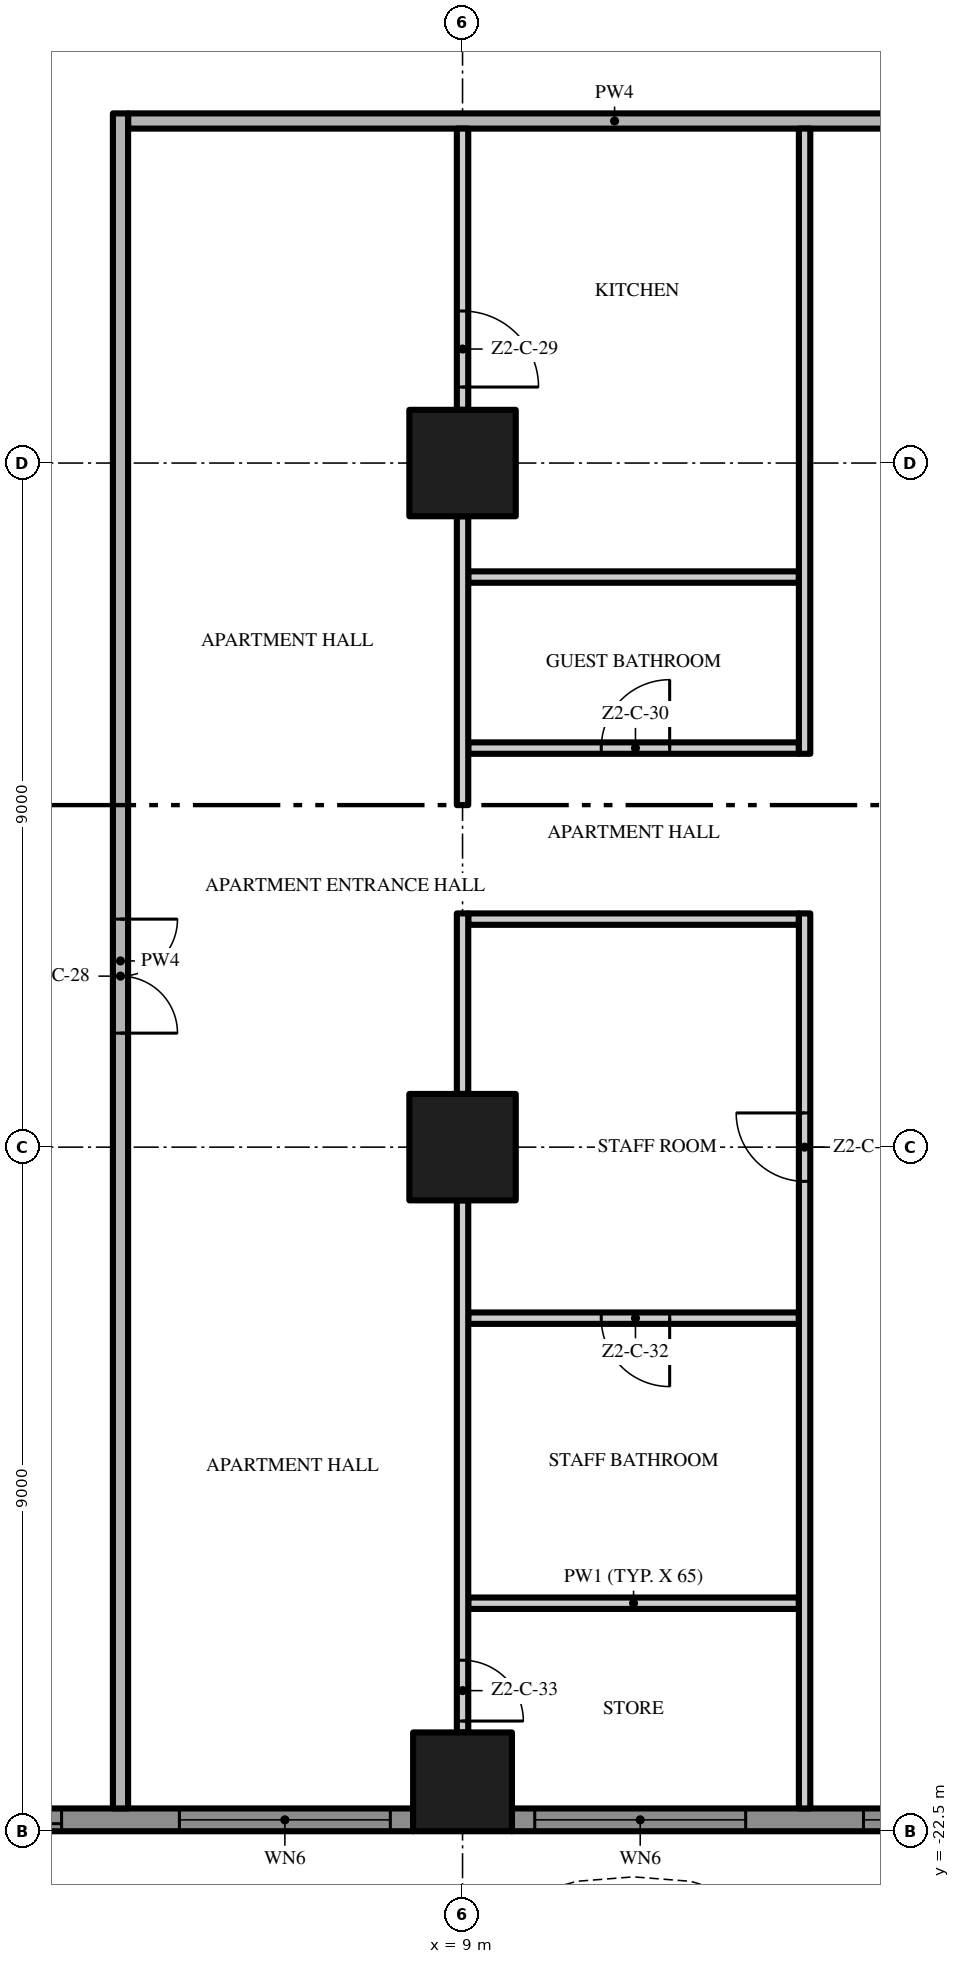
"""IFC4 building model, lengths in metres.
Left out: names, types, materials, properties, quantities, classifications, styles, units other than length and angle.
Written with IfcOpenShell. Run it as: python <this file> out.ifc"""

import sys

from ifc_helpers import new_model, si_unit, direction, frame, frame_2d, origin, origin_2d, place, context, subcontext, project, spatial, polyline, rectangle, outline, extrude, element, fill, save


model = new_model("IFC4")
c1 = context("Model", 3, precision=1e-05, world=origin(), true_north=direction((0.0, 1.0)))
c2 = subcontext(c1, "Body", "Model", "MODEL_VIEW")
j1 = project(units=[si_unit("LENGTHUNIT", "METRE"), si_unit("PLANEANGLEUNIT", "RADIAN")], contexts=[c1])
p1 = place(None, origin())
s1 = spatial("IfcSite", under=j1, at=p1, CompositionType="ELEMENT")
p2 = place(p1, origin())
s2 = spatial("IfcBuilding", under=s1, at=p2, CompositionType="ELEMENT")
p3 = place(p2, frame((0.0, 0.0, 92.2)))
s3 = spatial("IfcBuildingStorey", under=s2, at=p3, CompositionType="ELEMENT", Elevation=92.2)
p4 = place(p3, frame((9.0, -13.5, 0.0), z_axis=(0.0, 0.0, 1.0), x_axis=(1.0, 0.0, 0.0)))
e1 = element("IfcColumn", 1, at=p4, inside=s3, PredefinedType="COLUMN", context=c2, shape_type="SweptSolid", body=[
    extrude(rectangle(XDim=1.4, YDim=1.4, at=origin_2d()), origin(), (0.0, 0.0, 1.0), 3.5),
])
p5 = place(p3, frame((9.0, -21.85, 0.0), z_axis=(0.0, 0.0, 1.0), x_axis=(1.0, 0.0, 0.0)))
e2 = element("IfcColumn", 2, at=p5, inside=s3, PredefinedType="COLUMN", context=c2, shape_type="SweptSolid", body=[
    extrude(rectangle(XDim=1.3, YDim=1.3, at=origin_2d()), origin(), (0.0, 0.0, 1.0), 3.5),
])
p6 = place(p3, frame((9.0, -4.5, 0.0), z_axis=(0.0, 0.0, 1.0), x_axis=(1.0, 0.0, 0.0)))
e3 = element("IfcColumn", 3, at=p6, inside=s3, PredefinedType="COLUMN", context=c2, shape_type="SweptSolid", body=[
    extrude(rectangle(XDim=1.4, YDim=1.4, at=origin_2d()), origin(), (0.0, 0.0, 1.0), 3.5),
])
p7 = place(p3, frame((8.35, -22.35, 0.0), z_axis=(0.0, 0.0, 1.0), x_axis=(-1.0, 0.0, 0.0)))
e4 = element("IfcWall", 4, at=p7, inside=s3, PredefinedType="SOLIDWALL", context=c2, shape_type="SweptSolid", body=[
    extrude(rectangle(XDim=7.7, YDim=0.3, at=frame_2d((3.85, 0.0))), origin(), (0.0, 0.0, 1.0), 3.5),
])
p8 = place(p7, frame((4.625, 0.0, 0.0)))
e5 = element("IfcOpeningElement", 5, at=p8, cuts=e4, PredefinedType="OPENING", context=c2, shape_type="SweptSolid", body=[
    extrude(rectangle(XDim=2.775, YDim=2.4, at=frame_2d((1.387, 1.2))), frame((0.0, 0.16, 0.0), z_axis=(0.0, -1.0, 0.0), x_axis=(1.0, 0.0, 0.0)), (0.0, 0.0, 1.0), 0.32),
])
p9 = place(p7, frame((0.3, 0.0, 0.45)))
e6 = element("IfcOpeningElement", 6, at=p9, cuts=e4, PredefinedType="OPENING", context=c2, shape_type="SweptSolid", body=[
    extrude(rectangle(XDim=2.775, YDim=2.65, at=frame_2d((1.387, 1.325))), frame((0.0, 0.16, 0.0), z_axis=(0.0, -1.0, 0.0), x_axis=(1.0, 0.0, 0.0)), (0.0, 0.0, 1.0), 0.32),
])
p10 = place(p3, frame((17.35, -22.35, 0.0), z_axis=(0.0, 0.0, 1.0), x_axis=(-1.0, 0.0, 0.0)))
e7 = element("IfcWall", 7, at=p10, inside=s3, PredefinedType="SOLIDWALL", context=c2, shape_type="SweptSolid", body=[
    extrude(rectangle(XDim=7.7, YDim=0.3, at=frame_2d((3.85, 0.0))), origin(), (0.0, 0.0, 1.0), 3.5),
])
p11 = place(p10, frame((4.625, 0.0, 0.45)))
e8 = element("IfcOpeningElement", 8, at=p11, cuts=e7, PredefinedType="OPENING", context=c2, shape_type="SweptSolid", body=[
    extrude(rectangle(XDim=2.775, YDim=2.65, at=frame_2d((1.387, 1.325))), frame((0.0, 0.16, 0.0), z_axis=(0.0, -1.0, 0.0), x_axis=(1.0, 0.0, 0.0)), (0.0, 0.0, 1.0), 0.32),
])
p12 = place(p10, frame((0.3, 0.0, 0.45)))
e9 = element("IfcOpeningElement", 9, at=p12, cuts=e7, PredefinedType="OPENING", context=c2, shape_type="SweptSolid", body=[
    extrude(rectangle(XDim=2.775, YDim=2.65, at=frame_2d((1.387, 1.325))), frame((0.0, 0.16, 0.0), z_axis=(0.0, -1.0, 0.0), x_axis=(1.0, 0.0, 0.0)), (0.0, 0.0, 1.0), 0.32),
])
p13 = place(p3, origin())
e10 = element("IfcWall", 10, at=p13, inside=s3, PredefinedType="USERDEFINED", context=c2, shape_type="SweptSolid", body=[
    extrude(outline(polyline([(-22.5, -24.3), (-21.0, -23.595), (-19.5, -23.159), (-18.75, -23.1), (-18.0, -23.159), (-16.5, -23.595), (-15.0, -24.3), (-13.5, -25.005), (-12.0, -25.441), (-11.25, -25.5), (-10.5, -25.441), (-9.0, -25.005), (-7.5, -24.3), (-6.0, -23.595), (-4.5, -23.159), (-3.75, -23.1), (-3.0, -23.159), (-1.5, -23.595), (0.0, -24.3), (1.5, -25.005), (3.0, -25.441), (3.75, -25.5), (4.5, -25.441), (6.0, -25.005), (7.5, -24.3), (9.0, -23.595), (10.5, -23.159), (11.25, -23.1), (12.0, -23.159), (13.5, -23.595), (15.0, -24.3), (16.5, -25.005), (18.0, -25.441), (18.75, -25.5), (19.5, -25.441), (21.0, -25.005), (22.5, -24.3), (22.394, -24.074), (20.911, -24.771), (19.455, -25.194), (18.75, -25.249), (18.045, -25.194), (16.589, -24.771), (15.106, -24.074), (13.589, -23.36), (12.045, -22.911), (11.25, -22.849), (10.455, -22.911), (8.911, -23.36), (7.394, -24.074), (5.911, -24.771), (4.455, -25.194), (3.75, -25.249), (3.045, -25.194), (1.589, -24.771), (0.106, -24.074), (-1.411, -23.36), (-2.955, -22.911), (-3.75, -22.849), (-4.545, -22.911), (-6.089, -23.36), (-7.606, -24.074), (-9.089, -24.771), (-10.545, -25.194), (-11.25, -25.249), (-11.955, -25.194), (-13.411, -24.771), (-14.894, -24.074), (-16.411, -23.36), (-17.955, -22.911), (-18.75, -22.849), (-19.545, -22.911), (-21.089, -23.36), (-22.606, -24.074), (-22.5, -24.3)])), origin(), (0.0, 0.0, 1.0), 0.9),
])
p14 = place(p3, frame((9.075, -19.5, 0.0), z_axis=(0.0, 0.0, 1.0), x_axis=(1.0, 0.0, 0.0)))
e11 = element("IfcWall", 11, at=p14, inside=s3, PredefinedType="PARTITIONING", context=c2, shape_type="SweptSolid", body=[
    extrude(rectangle(XDim=4.35, YDim=0.15, at=frame_2d((2.175, 0.0))), origin(), (0.0, 0.0, 1.0), 3.5),
])
p15 = place(p3, frame((13.425, -15.75, 0.0), z_axis=(0.0, 0.0, 1.0), x_axis=(-1.0, 0.0, 0.0)))
e12 = element("IfcWall", 12, at=p15, inside=s3, PredefinedType="PARTITIONING", context=c2, shape_type="SweptSolid", body=[
    extrude(rectangle(XDim=4.35, YDim=0.15, at=frame_2d((2.175, 0.0))), origin(), (0.0, 0.0, 1.0), 3.5),
])
p16 = place(p15, frame((1.7, 0.0, 0.0)))
e13 = element("IfcOpeningElement", 13, at=p16, cuts=e12, PredefinedType="OPENING", context=c2, shape_type="SweptSolid", body=[
    extrude(rectangle(XDim=0.9, YDim=2.1, at=frame_2d((0.45, 1.05))), frame((0.0, 0.085, 0.0), z_axis=(0.0, -1.0, 0.0), x_axis=(1.0, 0.0, 0.0)), (0.0, 0.0, 1.0), 0.17),
])
p17 = place(p3, frame((9.075, -10.5, 0.0), z_axis=(0.0, 0.0, 1.0), x_axis=(1.0, 0.0, 0.0)))
e14 = element("IfcWall", 14, at=p17, inside=s3, PredefinedType="PARTITIONING", context=c2, shape_type="SweptSolid", body=[
    extrude(rectangle(XDim=4.35, YDim=0.15, at=frame_2d((2.175, 0.0))), origin(), (0.0, 0.0, 1.0), 3.5),
])
p18 = place(p3, frame((9.075, -8.25, 0.0), z_axis=(0.0, 0.0, 1.0), x_axis=(1.0, 0.0, 0.0)))
e15 = element("IfcWall", 15, at=p18, inside=s3, PredefinedType="PARTITIONING", context=c2, shape_type="SweptSolid", body=[
    extrude(rectangle(XDim=4.35, YDim=0.15, at=frame_2d((2.175, 0.0))), origin(), (0.0, 0.0, 1.0), 3.5),
])
p19 = place(p18, frame((1.75, 0.0, 0.0)))
e16 = element("IfcOpeningElement", 16, at=p19, cuts=e15, PredefinedType="OPENING", context=c2, shape_type="SweptSolid", body=[
    extrude(rectangle(XDim=0.9, YDim=2.1, at=frame_2d((0.45, 1.05))), frame((0.0, 0.085, 0.0), z_axis=(0.0, -1.0, 0.0), x_axis=(1.0, 0.0, 0.0)), (0.0, 0.0, 1.0), 0.17),
])
p20 = place(p3, frame((9.075, -6.0, 0.0), z_axis=(0.0, 0.0, 1.0), x_axis=(1.0, 0.0, 0.0)))
e17 = element("IfcWall", 17, at=p20, inside=s3, PredefinedType="PARTITIONING", context=c2, shape_type="SweptSolid", body=[
    extrude(rectangle(XDim=4.35, YDim=0.15, at=frame_2d((2.175, 0.0))), origin(), (0.0, 0.0, 1.0), 3.5),
])
p21 = place(p3, frame((4.6, 0.0, 0.0), z_axis=(0.0, 0.0, 1.0), x_axis=(1.0, 0.0, 0.0)))
e18 = element("IfcWall", 18, at=p21, inside=s3, PredefinedType="PARTITIONING", context=c2, shape_type="SweptSolid", body=[
    extrude(rectangle(XDim=12.8, YDim=0.2, at=frame_2d((6.4, 0.0))), origin(), (0.0, 0.0, 1.0), 3.5),
])
p22 = place(p3, frame((4.5, 0.1, 0.0), z_axis=(0.0, 0.0, 1.0), x_axis=(0.0, -1.0, 0.0)))
e19 = element("IfcWall", 19, at=p22, inside=s3, PredefinedType="PARTITIONING", context=c2, shape_type="SweptSolid", body=[
    extrude(rectangle(XDim=22.3, YDim=0.2, at=frame_2d((11.15, 0.0))), origin(), (0.0, 0.0, 1.0), 3.5),
])
p23 = place(p22, frame((10.6, 0.0, 0.0)))
e20 = element("IfcOpeningElement", 20, at=p23, cuts=e19, PredefinedType="OPENING", context=c2, shape_type="SweptSolid", body=[
    extrude(rectangle(XDim=1.5, YDim=2.4, at=frame_2d((0.75, 1.2))), frame((0.0, 0.11, 0.0), z_axis=(0.0, -1.0, 0.0), x_axis=(1.0, 0.0, 0.0)), (0.0, 0.0, 1.0), 0.22),
])
p24 = place(p3, frame((9.0, -14.2, 0.0), z_axis=(0.0, 0.0, 1.0), x_axis=(0.0, -1.0, 0.0)))
e21 = element("IfcWall", 21, at=p24, inside=s3, PredefinedType="PARTITIONING", context=c2, shape_type="SweptSolid", body=[
    extrude(rectangle(XDim=7.0, YDim=0.15, at=frame_2d((3.5, 0.0))), origin(), (0.0, 0.0, 1.0), 3.5),
])
p25 = place(p24, frame((6.05, 0.0, 0.0)))
e22 = element("IfcOpeningElement", 22, at=p25, cuts=e21, PredefinedType="OPENING", context=c2, shape_type="SweptSolid", body=[
    extrude(rectangle(XDim=0.8, YDim=2.0, at=frame_2d((0.4, 1.0))), frame((0.0, 0.085, 0.0), z_axis=(0.0, -1.0, 0.0), x_axis=(1.0, 0.0, 0.0)), (0.0, 0.0, 1.0), 0.17),
])
p26 = place(p3, frame((9.0, -12.8, 0.0), z_axis=(0.0, 0.0, 1.0), x_axis=(0.0, 1.0, 0.0)))
e23 = element("IfcWall", 23, at=p26, inside=s3, PredefinedType="PARTITIONING", context=c2, shape_type="SweptSolid", body=[
    extrude(rectangle(XDim=2.375, YDim=0.15, at=frame_2d((1.188, 0.0))), origin(), (0.0, 0.0, 1.0), 3.5),
])
p27 = place(p3, frame((9.0, -9.0, 0.0), z_axis=(0.0, 0.0, 1.0), x_axis=(0.0, 1.0, 0.0)))
e24 = element("IfcWall", 24, at=p27, inside=s3, PredefinedType="PARTITIONING", context=c2, shape_type="SweptSolid", body=[
    extrude(rectangle(XDim=3.8, YDim=0.15, at=frame_2d((1.9, 0.0))), origin(), (0.0, 0.0, 1.0), 3.5),
])
p28 = place(p3, frame((9.0, -0.1, 0.0), z_axis=(0.0, 0.0, 1.0), x_axis=(0.0, -1.0, 0.0)))
e25 = element("IfcWall", 25, at=p28, inside=s3, PredefinedType="PARTITIONING", context=c2, shape_type="SweptSolid", body=[
    extrude(rectangle(XDim=3.7, YDim=0.15, at=frame_2d((1.85, 0.0))), origin(), (0.0, 0.0, 1.0), 3.5),
])
p29 = place(p28, frame((2.4, 0.0, 0.0)))
e26 = element("IfcOpeningElement", 26, at=p29, cuts=e25, PredefinedType="OPENING", context=c2, shape_type="SweptSolid", body=[
    extrude(rectangle(XDim=1.0, YDim=2.4, at=frame_2d((0.5, 1.2))), frame((0.0, 0.085, 0.0), z_axis=(0.0, -1.0, 0.0), x_axis=(1.0, 0.0, 0.0)), (0.0, 0.0, 1.0), 0.17),
])
p30 = place(p3, frame((13.5, -22.2, 0.0), z_axis=(0.0, 0.0, 1.0), x_axis=(0.0, 1.0, 0.0)))
e27 = element("IfcWall", 27, at=p30, inside=s3, PredefinedType="PARTITIONING", context=c2, shape_type="SweptSolid", body=[
    extrude(rectangle(XDim=11.775, YDim=0.15, at=frame_2d((5.888, 0.0))), origin(), (0.0, 0.0, 1.0), 3.5),
])
p31 = place(p30, frame((8.25, 0.0, 0.0)))
e28 = element("IfcOpeningElement", 28, at=p31, cuts=e27, PredefinedType="OPENING", context=c2, shape_type="SweptSolid", body=[
    extrude(rectangle(XDim=0.9, YDim=2.1, at=frame_2d((0.45, 1.05))), frame((0.0, 0.085, 0.0), z_axis=(0.0, -1.0, 0.0), x_axis=(1.0, 0.0, 0.0)), (0.0, 0.0, 1.0), 0.17),
])
p32 = place(p3, frame((13.5, -8.325, 0.0), z_axis=(0.0, 0.0, 1.0), x_axis=(0.0, 1.0, 0.0)))
e29 = element("IfcWall", 29, at=p32, inside=s3, PredefinedType="PARTITIONING", context=c2, shape_type="SweptSolid", body=[
    extrude(rectangle(XDim=8.225, YDim=0.15, at=frame_2d((4.112, 0.0))), origin(), (0.0, 0.0, 1.0), 3.5),
])
p33 = place(p8, origin())
e30 = element("IfcDoor", 30, at=p33, inside=s3, OperationType="SINGLE_SWING_LEFT", PredefinedType="DOOR", context=c2, shape_type="SweptSolid", body=[
    extrude(rectangle(XDim=2.775, YDim=2.4, at=frame_2d((1.387, 1.2))), frame((0.0, 0.025, 0.0), z_axis=(0.0, -1.0, 0.0), x_axis=(1.0, 0.0, 0.0)), (0.0, 0.0, 1.0), 0.05),
])
fill(e5, e30)
p34 = place(p9, origin())
e31 = element("IfcWindow", 31, at=p34, inside=s3, PartitioningType="SINGLE_PANEL", PredefinedType="WINDOW", context=c2, shape_type="SweptSolid", body=[
    extrude(rectangle(XDim=2.775, YDim=2.65, at=frame_2d((1.387, 1.325))), frame((0.0, 0.03, 0.0), z_axis=(0.0, -1.0, 0.0), x_axis=(1.0, 0.0, 0.0)), (0.0, 0.0, 1.0), 0.06),
])
fill(e6, e31)
p35 = place(p11, origin())
e32 = element("IfcWindow", 32, at=p35, inside=s3, PartitioningType="SINGLE_PANEL", PredefinedType="WINDOW", context=c2, shape_type="SweptSolid", body=[
    extrude(rectangle(XDim=2.775, YDim=2.65, at=frame_2d((1.387, 1.325))), frame((0.0, 0.03, 0.0), z_axis=(0.0, -1.0, 0.0), x_axis=(1.0, 0.0, 0.0)), (0.0, 0.0, 1.0), 0.06),
])
fill(e8, e32)
p36 = place(p12, origin())
e33 = element("IfcWindow", 33, at=p36, inside=s3, PartitioningType="SINGLE_PANEL", PredefinedType="WINDOW", context=c2, shape_type="SweptSolid", body=[
    extrude(rectangle(XDim=2.775, YDim=2.65, at=frame_2d((1.387, 1.325))), frame((0.0, 0.03, 0.0), z_axis=(0.0, -1.0, 0.0), x_axis=(1.0, 0.0, 0.0)), (0.0, 0.0, 1.0), 0.06),
])
fill(e9, e33)
p37 = place(p23, origin())
e34 = element("IfcDoor", 34, at=p37, inside=s3, OperationType="DOUBLE_DOOR_SINGLE_SWING", PredefinedType="DOOR", context=c2, shape_type="SweptSolid", body=[
    extrude(rectangle(XDim=1.5, YDim=2.4, at=frame_2d((0.75, 1.2))), frame((0.0, 0.025, 0.0), z_axis=(0.0, -1.0, 0.0), x_axis=(1.0, 0.0, 0.0)), (0.0, 0.0, 1.0), 0.05),
])
fill(e20, e34)
p38 = place(p29, origin())
e35 = element("IfcDoor", 35, at=p38, inside=s3, OperationType="SINGLE_SWING_RIGHT", PredefinedType="DOOR", context=c2, shape_type="SweptSolid", body=[
    extrude(rectangle(XDim=1.0, YDim=2.4, at=frame_2d((0.5, 1.2))), frame((0.0, 0.025, 0.0), z_axis=(0.0, -1.0, 0.0), x_axis=(1.0, 0.0, 0.0)), (0.0, 0.0, 1.0), 0.05),
])
fill(e26, e35)
p39 = place(p19, origin())
e36 = element("IfcDoor", 36, at=p39, inside=s3, OperationType="SINGLE_SWING_RIGHT", PredefinedType="DOOR", context=c2, shape_type="SweptSolid", body=[
    extrude(rectangle(XDim=0.9, YDim=2.1, at=frame_2d((0.45, 1.05))), frame((0.0, 0.025, 0.0), z_axis=(0.0, -1.0, 0.0), x_axis=(1.0, 0.0, 0.0)), (0.0, 0.0, 1.0), 0.05),
])
fill(e16, e36)
p40 = place(p31, origin())
e37 = element("IfcDoor", 37, at=p40, inside=s3, OperationType="SINGLE_SWING_RIGHT", PredefinedType="DOOR", context=c2, shape_type="SweptSolid", body=[
    extrude(rectangle(XDim=0.9, YDim=2.1, at=frame_2d((0.45, 1.05))), frame((0.0, 0.025, 0.0), z_axis=(0.0, -1.0, 0.0), x_axis=(1.0, 0.0, 0.0)), (0.0, 0.0, 1.0), 0.05),
])
fill(e28, e37)
p41 = place(p16, origin())
e38 = element("IfcDoor", 38, at=p41, inside=s3, OperationType="SINGLE_SWING_LEFT", PredefinedType="DOOR", context=c2, shape_type="SweptSolid", body=[
    extrude(rectangle(XDim=0.9, YDim=2.1, at=frame_2d((0.45, 1.05))), frame((0.0, 0.025, 0.0), z_axis=(0.0, -1.0, 0.0), x_axis=(1.0, 0.0, 0.0)), (0.0, 0.0, 1.0), 0.05),
])
fill(e13, e38)
p42 = place(p25, origin())
e39 = element("IfcDoor", 39, at=p42, inside=s3, OperationType="SINGLE_SWING_RIGHT", PredefinedType="DOOR", context=c2, shape_type="SweptSolid", body=[
    extrude(rectangle(XDim=0.8, YDim=2.0, at=frame_2d((0.4, 1.0))), frame((0.0, 0.025, 0.0), z_axis=(0.0, -1.0, 0.0), x_axis=(1.0, 0.0, 0.0)), (0.0, 0.0, 1.0), 0.05),
])
fill(e22, e39)
save(model, sys.argv[1])
